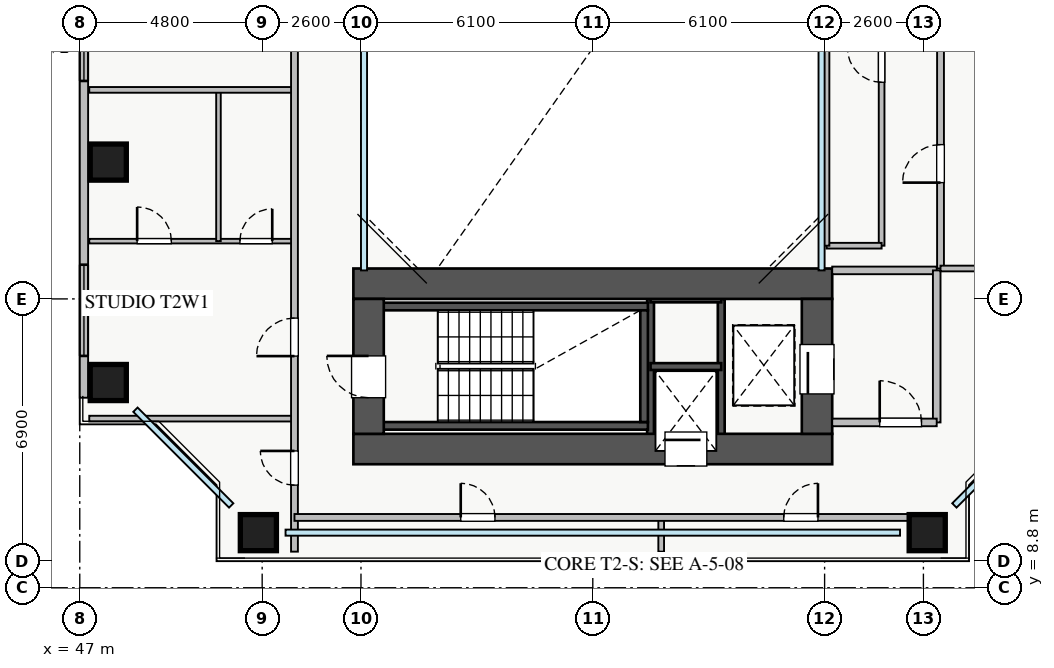
"""IFC4 building model, lengths in metres.
Left out: names, types, materials, properties, quantities, classifications, styles, units other than length and angle.
Written with IfcOpenShell. Run it as: python <this file> out.ifc"""

import sys

from ifc_helpers import new_model, si_unit, direction, frame, frame_2d, origin, origin_2d, place, context, subcontext, project, spatial, rectangle, extrude, source, transform, mapped, element, fill, save


model = new_model("IFC4")
c1 = context("Model", 3, precision=1e-05, world=origin(), true_north=direction((0.0, 1.0)))
c2 = subcontext(c1, "Body", "Model", "MODEL_VIEW")
j1 = project(units=[si_unit("LENGTHUNIT", "METRE"), si_unit("PLANEANGLEUNIT", "RADIAN")], contexts=[c1])
p1 = place(None, origin())
s1 = spatial("IfcSite", under=j1, at=p1, CompositionType="ELEMENT")
p2 = place(p1, origin())
s2 = spatial("IfcBuilding", under=s1, at=p2, CompositionType="ELEMENT")
p3 = place(p2, frame((0.0, 0.0, 26.25)))
s3 = spatial("IfcBuildingStorey", under=s2, at=p3, CompositionType="ELEMENT", Elevation=26.25)
for number, where, z_axis, x_axis in (
    (1, (62.02, 12.45, 0.0), (0.0, 0.0, 1.0), (0.0, 1.0, 0.0)),
    (2, (63.88, 12.45, 0.0), (0.0, 0.0, 1.0), (0.0, 1.0, 0.0)),
):
    element("IfcWall", number, at=place(p3, frame(where, z_axis=z_axis, x_axis=x_axis)), inside=s3, PredefinedType="SHEAR", context=c2, shape_type="SweptSolid", body=[
        extrude(rectangle(XDim=3.95, YDim=0.18, at=frame_2d((1.975, 0.0))), origin(), (0.0, 0.0, 1.0), 3.07),
    ])
for number, where, z_axis, x_axis in (
    (3, (62.02, 14.62, 0.0), (0.0, 0.0, 1.0), (1.0, 0.0, 0.0)),
    (4, (62.02, 16.4, 0.0), (0.0, 0.0, 1.0), (1.0, 0.0, 0.0)),
):
    element("IfcWall", number, at=place(p3, frame(where, z_axis=z_axis, x_axis=x_axis)), inside=s3, PredefinedType="SHEAR", context=c2, shape_type="SweptSolid", body=[
        extrude(rectangle(XDim=1.86, YDim=0.18, at=frame_2d((0.93, 0.0))), origin(), (0.0, 0.0, 1.0), 3.07),
    ])
for number, where, z_axis, x_axis in (
    (5, (54.8, 13.06, 0.0), (0.0, 0.0, 1.0), (1.0, 0.0, 0.0)),
    (6, (54.8, 16.2, 0.0), (0.0, 0.0, 1.0), (1.0, 0.0, 0.0)),
):
    element("IfcWall", number, at=place(p3, frame(where, z_axis=z_axis, x_axis=x_axis)), inside=s3, PredefinedType="SHEAR", context=c2, shape_type="SweptSolid", body=[
        extrude(rectangle(XDim=7.15, YDim=0.2, at=frame_2d((3.575, 0.0))), origin(), (0.0, 0.0, 1.0), 3.25),
    ])
p4 = place(p3, frame((61.85, 13.16, 0.0), z_axis=(0.0, 0.0, 1.0), x_axis=(0.0, 1.0, 0.0)))
e7 = element("IfcWall", 7, at=p4, inside=s3, PredefinedType="SHEAR", context=c2, shape_type="SweptSolid", body=[
    extrude(rectangle(XDim=2.94, YDim=0.2, at=frame_2d((1.47, 0.0))), origin(), (0.0, 0.0, 1.0), 3.25),
])
p5 = place(p3, frame((54.2, 12.45, 0.0), z_axis=(0.0, 0.0, 1.0), x_axis=(1.0, 0.0, 0.0)))
e8 = element("IfcWall", 8, at=p5, inside=s3, PredefinedType="SHEAR", context=c2, shape_type="SweptSolid", body=[
    extrude(rectangle(XDim=12.6, YDim=0.8, at=frame_2d((6.3, 0.0))), origin(), (0.0, 0.0, 1.0), 3.25),
])
p6 = place(p5, frame((8.2, 0.0, 0.0)))
e9 = element("IfcOpeningElement", 9, at=p6, cuts=e8, PredefinedType="OPENING", context=c2, shape_type="SweptSolid", body=[
    extrude(rectangle(XDim=1.1, YDim=2.05, at=frame_2d((0.55, 1.025))), frame((0.0, 0.41, 0.0), z_axis=(0.0, -1.0, 0.0), x_axis=(1.0, 0.0, 0.0)), (0.0, 0.0, 1.0), 0.82),
])
p7 = place(p3, frame((54.2, 16.8, 0.0), z_axis=(0.0, 0.0, 1.0), x_axis=(1.0, 0.0, 0.0)))
e10 = element("IfcWall", 10, at=p7, inside=s3, PredefinedType="SHEAR", context=c2, shape_type="SweptSolid", body=[
    extrude(rectangle(XDim=12.6, YDim=0.8, at=frame_2d((6.3, 0.0))), origin(), (0.0, 0.0, 1.0), 3.25),
])
p8 = place(p3, frame((54.6, 12.85, 0.0), z_axis=(0.0, 0.0, 1.0), x_axis=(0.0, 1.0, 0.0)))
e11 = element("IfcWall", 11, at=p8, inside=s3, PredefinedType="SHEAR", context=c2, shape_type="SweptSolid", body=[
    extrude(rectangle(XDim=3.55, YDim=0.8, at=frame_2d((1.775, 0.0))), origin(), (0.0, 0.0, 1.0), 3.25),
])
p9 = place(p8, frame((0.95, 0.0, 0.0)))
e12 = element("IfcOpeningElement", 12, at=p9, cuts=e11, PredefinedType="OPENING", context=c2, shape_type="SweptSolid", body=[
    extrude(rectangle(XDim=1.1, YDim=2.05, at=frame_2d((0.55, 1.025))), frame((0.0, 0.41, 0.0), z_axis=(0.0, -1.0, 0.0), x_axis=(1.0, 0.0, 0.0)), (0.0, 0.0, 1.0), 0.82),
])
p10 = place(p3, frame((66.4, 12.85, 0.0), z_axis=(0.0, 0.0, 1.0), x_axis=(0.0, 1.0, 0.0)))
e13 = element("IfcWall", 13, at=p10, inside=s3, PredefinedType="SHEAR", context=c2, shape_type="SweptSolid", body=[
    extrude(rectangle(XDim=3.55, YDim=0.8, at=frame_2d((1.775, 0.0))), origin(), (0.0, 0.0, 1.0), 3.25),
])
p11 = place(p10, frame((1.05, 0.0, 0.0)))
e14 = element("IfcOpeningElement", 14, at=p11, cuts=e13, PredefinedType="OPENING", context=c2, shape_type="SweptSolid", body=[
    extrude(rectangle(XDim=1.3, YDim=2.05, at=frame_2d((0.65, 1.025))), frame((0.0, 0.41, 0.0), z_axis=(0.0, -1.0, 0.0), x_axis=(1.0, 0.0, 0.0)), (0.0, 0.0, 1.0), 0.82),
])
m1 = source(origin(), c2, "Body", "SweptSolid", [
    extrude(rectangle(XDim=0.95, YDim=0.95, at=origin_2d()), origin(), (0.0, 0.0, 1.0), 3.25),
])
for number, where, z_axis, x_axis in (
    (15, (51.7, 10.25, 0.0), (0.0, 0.0, 1.0), (1.0, 0.0, 0.0)),
    (16, (69.3, 10.25, 0.0), (0.0, 0.0, 1.0), (1.0, 0.0, 0.0)),
    (17, (47.75, 14.2, 0.0), (0.0, 0.0, 1.0), (1.0, 0.0, 0.0)),
    (18, (47.75, 20.0, 0.0), (0.0, 0.0, 1.0), (1.0, 0.0, 0.0)),
):
    element("IfcColumn", number, at=place(p3, frame(where, z_axis=z_axis, x_axis=x_axis)), inside=s3, PredefinedType="COLUMN", context=c2, shape_type="MappedRepresentation", body=[
        mapped(m1, transform((0.0, 0.0, 0.0), x_axis=(1.0, 0.0, 0.0), y_axis=(0.0, 1.0, 0.0), z_axis=(0.0, 0.0, 1.0), scale=1.0)),
    ])
p12 = place(p3, frame((47.11, 13.8, 0.0), z_axis=(0.0, 0.0, 1.0), x_axis=(0.0, 1.0, 0.0)))
e19 = element("IfcWall", 19, at=p12, inside=s3, PredefinedType="STANDARD", context=c2, shape_type="SweptSolid", body=[
    extrude(rectangle(XDim=18.4, YDim=0.22, at=frame_2d((9.2, 0.0))), origin(), (0.0, 0.0, 1.0), 2.61),
])
p13 = place(p12, frame((1.1, 0.0, 0.9)))
e20 = element("IfcOpeningElement", 20, at=p13, cuts=e19, PredefinedType="OPENING", context=c2, shape_type="SweptSolid", body=[
    extrude(rectangle(XDim=2.4, YDim=1.48, at=frame_2d((1.2, 0.74))), frame((0.0, 0.12, 0.0), z_axis=(0.0, -1.0, 0.0), x_axis=(1.0, 0.0, 0.0)), (0.0, 0.0, 1.0), 0.24),
])
p14 = place(p12, frame((15.05, 0.0, 0.9)))
e21 = element("IfcOpeningElement", 21, at=p14, cuts=e19, PredefinedType="OPENING", context=c2, shape_type="SweptSolid", body=[
    extrude(rectangle(XDim=2.1, YDim=1.48, at=frame_2d((1.05, 0.74))), frame((0.0, 0.12, 0.0), z_axis=(0.0, -1.0, 0.0), x_axis=(1.0, 0.0, 0.0)), (0.0, 0.0, 1.0), 0.24),
])
p15 = place(p12, frame((8.335, 0.0, 0.9)))
e22 = element("IfcOpeningElement", 22, at=p15, cuts=e19, PredefinedType="OPENING", context=c2, shape_type="SweptSolid", body=[
    extrude(rectangle(XDim=0.9, YDim=1.2, at=frame_2d((0.45, 0.6))), frame((0.0, 0.12, 0.0), z_axis=(0.0, -1.0, 0.0), x_axis=(1.0, 0.0, 0.0)), (0.0, 0.0, 1.0), 0.24),
])
p16 = place(p3, frame((66.8, 17.15, 0.0), z_axis=(0.0, 0.0, 1.0), x_axis=(1.0, 0.0, 0.0)))
e23 = element("IfcWall", 23, at=p16, inside=s3, PredefinedType="PARTITIONING", context=c2, shape_type="SweptSolid", body=[
    extrude(rectangle(XDim=2.75, YDim=0.2, at=frame_2d((1.375, 0.0))), origin(), (0.0, 0.0, 1.0), 3.07),
])
p17 = place(p3, frame((69.55, 13.15, 0.0), z_axis=(0.0, 0.0, 1.0), x_axis=(0.0, 1.0, 0.0)))
e24 = element("IfcWall", 24, at=p17, inside=s3, PredefinedType="PARTITIONING", context=c2, shape_type="SweptSolid", body=[
    extrude(rectangle(XDim=4.0, YDim=0.2, at=frame_2d((2.0, 0.0))), origin(), (0.0, 0.0, 1.0), 2.615),
])
p18 = place(p3, frame((66.8, 13.15, 0.0), z_axis=(0.0, 0.0, 1.0), x_axis=(1.0, 0.0, 0.0)))
e25 = element("IfcWall", 25, at=p18, inside=s3, PredefinedType="PARTITIONING", context=c2, shape_type="SweptSolid", body=[
    extrude(rectangle(XDim=2.75, YDim=0.2, at=frame_2d((1.375, 0.0))), origin(), (0.0, 0.0, 1.0), 3.07),
])
p19 = place(p18, frame((1.25, 0.0, 0.0)))
e26 = element("IfcOpeningElement", 26, at=p19, cuts=e25, PredefinedType="OPENING", context=c2, shape_type="SweptSolid", body=[
    extrude(rectangle(XDim=1.1, YDim=2.05, at=frame_2d((0.55, 1.025))), frame((0.0, 0.11, 0.0), z_axis=(0.0, -1.0, 0.0), x_axis=(1.0, 0.0, 0.0)), (0.0, 0.0, 1.0), 0.22),
])
p20 = place(p3, frame((47.25, 13.25, 0.0), z_axis=(0.0, 0.0, 1.0), x_axis=(1.0, 0.0, 0.0)))
e27 = element("IfcWall", 27, at=p20, inside=s3, PredefinedType="PARTITIONING", context=c2, shape_type="SweptSolid", body=[
    extrude(rectangle(XDim=5.4, YDim=0.15, at=frame_2d((2.7, 0.0))), origin(), (0.0, 0.0, 1.0), 3.07),
])
p21 = place(p3, frame((47.25, 17.92, 0.0), z_axis=(0.0, 0.0, 1.0), x_axis=(1.0, 0.0, 0.0)))
e28 = element("IfcWall", 28, at=p21, inside=s3, PredefinedType="PLUMBINGWALL", context=c2, shape_type="SweptSolid", body=[
    extrude(rectangle(XDim=5.4, YDim=0.12, at=frame_2d((2.7, 0.0))), origin(), (0.0, 0.0, 1.0), 3.07),
])
p22 = place(p21, frame((1.26, 0.0, 0.0)))
e29 = element("IfcOpeningElement", 29, at=p22, cuts=e28, PredefinedType="OPENING", context=c2, shape_type="SweptSolid", body=[
    extrude(rectangle(XDim=0.9, YDim=2.05, at=frame_2d((0.45, 1.025))), frame((0.0, 0.07, 0.0), z_axis=(0.0, -1.0, 0.0), x_axis=(1.0, 0.0, 0.0)), (0.0, 0.0, 1.0), 0.14),
])
p23 = place(p21, frame((3.965, 0.0, 0.0)))
e30 = element("IfcOpeningElement", 30, at=p23, cuts=e28, PredefinedType="OPENING", context=c2, shape_type="SweptSolid", body=[
    extrude(rectangle(XDim=0.85, YDim=2.05, at=frame_2d((0.425, 1.025))), frame((0.0, 0.07, 0.0), z_axis=(0.0, -1.0, 0.0), x_axis=(1.0, 0.0, 0.0)), (0.0, 0.0, 1.0), 0.14),
])
p24 = place(p3, frame((50.65, 17.92, 0.0), z_axis=(0.0, 0.0, 1.0), x_axis=(0.0, 1.0, 0.0)))
e31 = element("IfcWall", 31, at=p24, inside=s3, PredefinedType="PLUMBINGWALL", context=c2, shape_type="SweptSolid", body=[
    extrude(rectangle(XDim=3.98, YDim=0.12, at=frame_2d((1.99, 0.0))), origin(), (0.0, 0.0, 1.0), 3.07),
])
p25 = place(p3, frame((47.25, 21.9, 0.0), z_axis=(0.0, 0.0, 1.0), x_axis=(1.0, 0.0, 0.0)))
e32 = element("IfcWall", 32, at=p25, inside=s3, PredefinedType="PARTITIONING", context=c2, shape_type="SweptSolid", body=[
    extrude(rectangle(XDim=5.4, YDim=0.15, at=frame_2d((2.7, 0.0))), origin(), (0.0, 0.0, 1.0), 3.07),
])
p26 = place(p3, frame((52.65, 9.75, 0.0), z_axis=(0.0, 0.0, 1.0), x_axis=(0.0, 1.0, 0.0)))
e33 = element("IfcWall", 33, at=p26, inside=s3, PredefinedType="PARTITIONING", context=c2, shape_type="SweptSolid", body=[
    extrude(rectangle(XDim=26.5, YDim=0.18, at=frame_2d((13.25, 0.0))), origin(), (0.0, 0.0, 1.0), 3.07),
])
p27 = place(p26, frame((23.85, 0.0, 0.0)))
e34 = element("IfcOpeningElement", 34, at=p27, cuts=e33, PredefinedType="OPENING", context=c2, shape_type="SweptSolid", body=[
    extrude(rectangle(XDim=0.9, YDim=2.05, at=frame_2d((0.45, 1.025))), frame((0.0, 0.1, 0.0), z_axis=(0.0, -1.0, 0.0), x_axis=(1.0, 0.0, 0.0)), (0.0, 0.0, 1.0), 0.2),
])
p28 = place(p26, frame((1.75, 0.0, 0.0)))
e35 = element("IfcOpeningElement", 35, at=p28, cuts=e33, PredefinedType="OPENING", context=c2, shape_type="SweptSolid", body=[
    extrude(rectangle(XDim=0.9, YDim=2.05, at=frame_2d((0.45, 1.025))), frame((0.0, 0.1, 0.0), z_axis=(0.0, -1.0, 0.0), x_axis=(1.0, 0.0, 0.0)), (0.0, 0.0, 1.0), 0.2),
])
p29 = place(p26, frame((5.145, 0.0, 0.0)))
e36 = element("IfcOpeningElement", 36, at=p29, cuts=e33, PredefinedType="OPENING", context=c2, shape_type="SweptSolid", body=[
    extrude(rectangle(XDim=1.0, YDim=2.05, at=frame_2d((0.5, 1.025))), frame((0.0, 0.1, 0.0), z_axis=(0.0, -1.0, 0.0), x_axis=(1.0, 0.0, 0.0)), (0.0, 0.0, 1.0), 0.2),
])
p30 = place(p26, frame((14.39, 0.0, 0.0)))
e37 = element("IfcOpeningElement", 37, at=p30, cuts=e33, PredefinedType="OPENING", context=c2, shape_type="SweptSolid", body=[
    extrude(rectangle(XDim=1.0, YDim=2.05, at=frame_2d((0.5, 1.025))), frame((0.0, 0.1, 0.0), z_axis=(0.0, -1.0, 0.0), x_axis=(1.0, 0.0, 0.0)), (0.0, 0.0, 1.0), 0.2),
])
p31 = place(p3, frame((69.65, 17.2, 0.0), z_axis=(0.0, 0.0, 1.0), x_axis=(0.0, 1.0, 0.0)))
e38 = element("IfcWall", 38, at=p31, inside=s3, PredefinedType="PARTITIONING", context=c2, shape_type="SweptSolid", body=[
    extrude(rectangle(XDim=11.6, YDim=0.18, at=frame_2d((5.8, 0.0))), origin(), (0.0, 0.0, 1.0), 3.07),
])
p32 = place(p31, frame((2.26, 0.0, 0.0)))
e39 = element("IfcOpeningElement", 39, at=p32, cuts=e38, PredefinedType="OPENING", context=c2, shape_type="SweptSolid", body=[
    extrude(rectangle(XDim=1.0, YDim=2.05, at=frame_2d((0.5, 1.025))), frame((0.0, 0.1, 0.0), z_axis=(0.0, -1.0, 0.0), x_axis=(1.0, 0.0, 0.0)), (0.0, 0.0, 1.0), 0.2),
])
p33 = place(p3, frame((69.65, 17.2, 0.0), z_axis=(0.0, 0.0, 1.0), x_axis=(1.0, 0.0, 0.0)))
e40 = element("IfcWall", 40, at=p33, inside=s3, PredefinedType="PARTITIONING", context=c2, shape_type="SweptSolid", body=[
    extrude(rectangle(XDim=4.1, YDim=0.15, at=frame_2d((2.05, 0.0))), origin(), (0.0, 0.0, 1.0), 3.07),
])
p34 = place(p3, frame((68.1, 17.8, 0.0), z_axis=(0.0, 0.0, 1.0), x_axis=(0.0, 1.0, 0.0)))
e41 = element("IfcWall", 41, at=p34, inside=s3, PredefinedType="PARTITIONING", context=c2, shape_type="SweptSolid", body=[
    extrude(rectangle(XDim=9.8, YDim=0.15, at=frame_2d((4.9, 0.0))), origin(), (0.0, 0.0, 1.0), 3.07),
])
p35 = place(p34, frame((4.3, 0.0, 0.0)))
e42 = element("IfcOpeningElement", 42, at=p35, cuts=e41, PredefinedType="OPENING", context=c2, shape_type="SweptSolid", body=[
    extrude(rectangle(XDim=0.9, YDim=2.05, at=frame_2d((0.45, 1.025))), frame((0.0, 0.085, 0.0), z_axis=(0.0, -1.0, 0.0), x_axis=(1.0, 0.0, 0.0)), (0.0, 0.0, 1.0), 0.17),
])
p36 = place(p3, frame((66.65, 17.8, 0.0), z_axis=(0.0, 0.0, 1.0), x_axis=(1.0, 0.0, 0.0)))
e43 = element("IfcWall", 43, at=p36, inside=s3, PredefinedType="PARTITIONING", context=c2, shape_type="SweptSolid", body=[
    extrude(rectangle(XDim=1.45, YDim=0.15, at=frame_2d((0.725, 0.0))), origin(), (0.0, 0.0, 1.0), 3.07),
])
p37 = place(p3, frame((66.65, 17.8, 0.0), z_axis=(0.0, 0.0, 1.0), x_axis=(0.0, 1.0, 0.0)))
e44 = element("IfcWall", 44, at=p37, inside=s3, PredefinedType="PARTITIONING", context=c2, shape_type="SweptSolid", body=[
    extrude(rectangle(XDim=9.8, YDim=0.15, at=frame_2d((4.9, 0.0))), origin(), (0.0, 0.0, 1.0), 2.665),
])
for number, where, z_axis, x_axis in (
    (45, (62.3, 9.75, 0.0), (0.0, 0.0, 1.0), (0.0, 1.0, 0.0)),
    (46, (69.65, 9.75, 0.0), (0.0, 0.0, 1.0), (0.0, 1.0, 0.0)),
):
    element("IfcWall", number, at=place(p3, frame(where, z_axis=z_axis, x_axis=x_axis)), inside=s3, PredefinedType="PARTITIONING", context=c2, shape_type="SweptSolid", body=[
        extrude(rectangle(XDim=0.9, YDim=0.15, at=frame_2d((0.45, 0.0))), origin(), (0.0, 0.0, 1.0), 3.07),
    ])
p38 = place(p3, frame((52.65, 10.65, 0.0), z_axis=(0.0, 0.0, 1.0), x_axis=(1.0, 0.0, 0.0)))
e47 = element("IfcWall", 47, at=p38, inside=s3, PredefinedType="PARTITIONING", context=c2, shape_type="SweptSolid", body=[
    extrude(rectangle(XDim=17.0, YDim=0.18, at=frame_2d((8.5, 0.0))), origin(), (0.0, 0.0, 1.0), 3.07),
])
p39 = place(p38, frame((4.375, 0.0, 0.0)))
e48 = element("IfcOpeningElement", 48, at=p39, cuts=e47, PredefinedType="OPENING", context=c2, shape_type="SweptSolid", body=[
    extrude(rectangle(XDim=0.9, YDim=2.05, at=frame_2d((0.45, 1.025))), frame((0.0, 0.1, 0.0), z_axis=(0.0, -1.0, 0.0), x_axis=(1.0, 0.0, 0.0)), (0.0, 0.0, 1.0), 0.2),
])
p40 = place(p38, frame((12.875, 0.0, 0.0)))
e49 = element("IfcOpeningElement", 49, at=p40, cuts=e47, PredefinedType="OPENING", context=c2, shape_type="SweptSolid", body=[
    extrude(rectangle(XDim=0.9, YDim=2.05, at=frame_2d((0.45, 1.025))), frame((0.0, 0.1, 0.0), z_axis=(0.0, -1.0, 0.0), x_axis=(1.0, 0.0, 0.0)), (0.0, 0.0, 1.0), 0.2),
])
m2 = source(origin(), c2, "Body", "SweptSolid", [
    extrude(rectangle(XDim=2.4, YDim=1.48, at=frame_2d((1.2, 0.74))), frame((0.0, 0.03, 0.0), z_axis=(0.0, -1.0, 0.0), x_axis=(1.0, 0.0, 0.0)), (0.0, 0.0, 1.0), 0.06),
])
p41 = place(p13, origin())
e50 = element("IfcWindow", 50, at=p41, inside=s3, PartitioningType="TRIPLE_PANEL_VERTICAL", PredefinedType="WINDOW", context=c2, shape_type="MappedRepresentation", body=[
    mapped(m2, transform((0.0, 0.0, 0.0), x_axis=(1.0, 0.0, 0.0), y_axis=(0.0, 1.0, 0.0), z_axis=(0.0, 0.0, 1.0), scale=1.0)),
])
fill(e20, e50)
m3 = source(origin(), c2, "Body", "SweptSolid", [
    extrude(rectangle(XDim=1.3, YDim=2.05, at=frame_2d((0.65, 1.025))), frame((0.0, 0.025, 0.0), z_axis=(0.0, -1.0, 0.0), x_axis=(1.0, 0.0, 0.0)), (0.0, 0.0, 1.0), 0.05),
])
p42 = place(p11, origin())
e51 = element("IfcDoor", 51, at=p42, inside=s3, OperationType="SLIDING_TO_RIGHT", PredefinedType="DOOR", context=c2, shape_type="MappedRepresentation", body=[
    mapped(m3, transform((0.0, 0.0, 0.0), x_axis=(1.0, 0.0, 0.0), y_axis=(0.0, 1.0, 0.0), z_axis=(0.0, 0.0, 1.0), scale=1.0)),
])
fill(e14, e51)
m4 = source(origin(), c2, "Body", "SweptSolid", [
    extrude(rectangle(XDim=1.1, YDim=2.05, at=frame_2d((0.55, 1.025))), frame((0.0, 0.025, 0.0), z_axis=(0.0, -1.0, 0.0), x_axis=(1.0, 0.0, 0.0)), (0.0, 0.0, 1.0), 0.05),
])
p43 = place(p9, origin())
e52 = element("IfcDoor", 52, at=p43, inside=s3, OperationType="SINGLE_SWING_RIGHT", PredefinedType="DOOR", context=c2, shape_type="MappedRepresentation", body=[
    mapped(m4, transform((0.0, 0.0, 0.0), x_axis=(1.0, 0.0, 0.0), y_axis=(0.0, 1.0, 0.0), z_axis=(0.0, 0.0, 1.0), scale=1.0)),
])
fill(e12, e52)
p44 = place(p6, origin())
e53 = element("IfcDoor", 53, at=p44, inside=s3, OperationType="SLIDING_TO_RIGHT", PredefinedType="DOOR", context=c2, shape_type="MappedRepresentation", body=[
    mapped(m4, transform((0.0, 0.0, 0.0), x_axis=(1.0, 0.0, 0.0), y_axis=(0.0, 1.0, 0.0), z_axis=(0.0, 0.0, 1.0), scale=1.0)),
])
fill(e9, e53)
p45 = place(p19, origin())
e54 = element("IfcDoor", 54, at=p45, inside=s3, OperationType="SINGLE_SWING_LEFT", PredefinedType="DOOR", context=c2, shape_type="MappedRepresentation", body=[
    mapped(m4, transform((0.0, 0.0, 0.0), x_axis=(1.0, 0.0, 0.0), y_axis=(0.0, 1.0, 0.0), z_axis=(0.0, 0.0, 1.0), scale=1.0)),
])
fill(e26, e54)
m5 = source(origin(), c2, "Body", "SweptSolid", [
    extrude(rectangle(XDim=0.9, YDim=2.05, at=frame_2d((0.45, 1.025))), frame((0.0, 0.025, 0.0), z_axis=(0.0, -1.0, 0.0), x_axis=(1.0, 0.0, 0.0)), (0.0, 0.0, 1.0), 0.05),
])
p46 = place(p22, origin())
e55 = element("IfcDoor", 55, at=p46, inside=s3, OperationType="SINGLE_SWING_LEFT", PredefinedType="DOOR", context=c2, shape_type="MappedRepresentation", body=[
    mapped(m5, transform((0.0, 0.0, 0.0), x_axis=(1.0, 0.0, 0.0), y_axis=(0.0, 1.0, 0.0), z_axis=(0.0, 0.0, 1.0), scale=1.0)),
])
fill(e29, e55)
m6 = source(origin(), c2, "Body", "SweptSolid", [
    extrude(rectangle(XDim=0.85, YDim=2.05, at=frame_2d((0.425, 1.025))), frame((0.0, 0.025, 0.0), z_axis=(0.0, -1.0, 0.0), x_axis=(1.0, 0.0, 0.0)), (0.0, 0.0, 1.0), 0.05),
])
p47 = place(p23, origin())
e56 = element("IfcDoor", 56, at=p47, inside=s3, OperationType="SINGLE_SWING_RIGHT", PredefinedType="DOOR", context=c2, shape_type="MappedRepresentation", body=[
    mapped(m6, transform((0.0, 0.0, 0.0), x_axis=(1.0, 0.0, 0.0), y_axis=(0.0, 1.0, 0.0), z_axis=(0.0, 0.0, 1.0), scale=1.0)),
])
fill(e30, e56)
p48 = place(p28, origin())
e57 = element("IfcDoor", 57, at=p48, inside=s3, OperationType="SINGLE_SWING_RIGHT", PredefinedType="DOOR", context=c2, shape_type="MappedRepresentation", body=[
    mapped(m5, transform((0.0, 0.0, 0.0), x_axis=(1.0, 0.0, 0.0), y_axis=(0.0, 1.0, 0.0), z_axis=(0.0, 0.0, 1.0), scale=1.0)),
])
fill(e35, e57)
m7 = source(origin(), c2, "Body", "SweptSolid", [
    extrude(rectangle(XDim=1.0, YDim=2.05, at=frame_2d((0.5, 1.025))), frame((0.0, 0.025, 0.0), z_axis=(0.0, -1.0, 0.0), x_axis=(1.0, 0.0, 0.0)), (0.0, 0.0, 1.0), 0.05),
])
p49 = place(p29, origin())
e58 = element("IfcDoor", 58, at=p49, inside=s3, OperationType="SINGLE_SWING_LEFT", PredefinedType="DOOR", context=c2, shape_type="MappedRepresentation", body=[
    mapped(m7, transform((0.0, 0.0, 0.0), x_axis=(1.0, 0.0, 0.0), y_axis=(0.0, 1.0, 0.0), z_axis=(0.0, 0.0, 1.0), scale=1.0)),
])
fill(e36, e58)
p50 = place(p32, origin())
e59 = element("IfcDoor", 59, at=p50, inside=s3, OperationType="SINGLE_SWING_LEFT", PredefinedType="DOOR", context=c2, shape_type="MappedRepresentation", body=[
    mapped(m7, transform((0.0, 0.0, 0.0), x_axis=(1.0, 0.0, 0.0), y_axis=(0.0, 1.0, 0.0), z_axis=(0.0, 0.0, 1.0), scale=1.0)),
])
fill(e39, e59)
p51 = place(p35, origin())
e60 = element("IfcDoor", 60, at=p51, inside=s3, OperationType="SINGLE_SWING_RIGHT", PredefinedType="DOOR", context=c2, shape_type="MappedRepresentation", body=[
    mapped(m5, transform((0.0, 0.0, 0.0), x_axis=(1.0, 0.0, 0.0), y_axis=(0.0, 1.0, 0.0), z_axis=(0.0, 0.0, 1.0), scale=1.0)),
])
fill(e42, e60)
p52 = place(p39, origin())
e61 = element("IfcDoor", 61, at=p52, inside=s3, OperationType="SINGLE_SWING_LEFT", PredefinedType="DOOR", context=c2, shape_type="MappedRepresentation", body=[
    mapped(m5, transform((0.0, 0.0, 0.0), x_axis=(1.0, 0.0, 0.0), y_axis=(0.0, 1.0, 0.0), z_axis=(0.0, 0.0, 1.0), scale=1.0)),
])
fill(e48, e61)
p53 = place(p40, origin())
e62 = element("IfcDoor", 62, at=p53, inside=s3, OperationType="SINGLE_SWING_RIGHT", PredefinedType="DOOR", context=c2, shape_type="MappedRepresentation", body=[
    mapped(m5, transform((0.0, 0.0, 0.0), x_axis=(1.0, 0.0, 0.0), y_axis=(0.0, 1.0, 0.0), z_axis=(0.0, 0.0, 1.0), scale=1.0)),
])
fill(e49, e62)
m8 = source(origin(), c2, "Body", "SweptSolid", [
    extrude(rectangle(XDim=0.9, YDim=1.2, at=frame_2d((0.45, 0.6))), frame((0.0, 0.03, 0.0), z_axis=(0.0, -1.0, 0.0), x_axis=(1.0, 0.0, 0.0)), (0.0, 0.0, 1.0), 0.06),
])
p54 = place(p15, origin())
e63 = element("IfcWindow", 63, at=p54, inside=s3, PartitioningType="SINGLE_PANEL", PredefinedType="WINDOW", context=c2, shape_type="MappedRepresentation", body=[
    mapped(m8, transform((0.0, 0.0, 0.0), x_axis=(1.0, 0.0, 0.0), y_axis=(0.0, 1.0, 0.0), z_axis=(0.0, 0.0, 1.0), scale=1.0)),
])
fill(e22, e63)
save(model, sys.argv[1])
